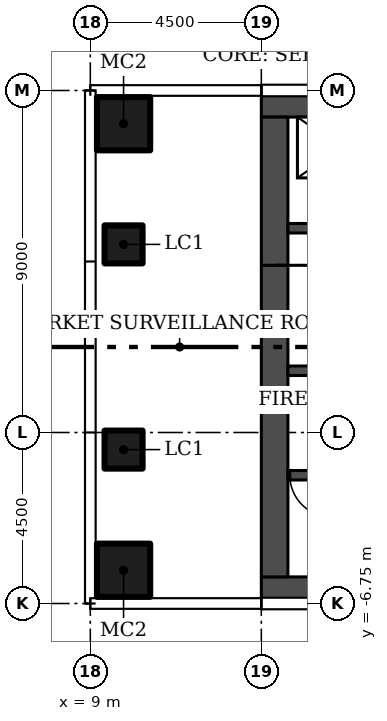
"""IFC4 building model, lengths in metres.
Left out: names, types, materials, properties, quantities, classifications, styles, units other than length and angle.
Written with IfcOpenShell. Run it as: python <this file> out.ifc"""

import sys

from ifc_helpers import new_model, si_unit, direction, frame, frame_2d, origin, origin_2d, place, context, subcontext, project, spatial, rectangle, hollow_rectangle, extrude, element, fill, save


model = new_model("IFC4")
c1 = context("Model", 3, precision=1e-05, world=origin(), true_north=direction((0.0, 1.0)))
c2 = subcontext(c1, "Body", "Model", "MODEL_VIEW")
j1 = project(units=[si_unit("LENGTHUNIT", "METRE"), si_unit("PLANEANGLEUNIT", "RADIAN")], contexts=[c1])
p1 = place(None, origin())
s1 = spatial("IfcSite", under=j1, at=p1, CompositionType="ELEMENT")
p2 = place(p1, origin())
s2 = spatial("IfcBuilding", under=s1, at=p2, CompositionType="ELEMENT")
p3 = place(p2, frame((0.0, 0.0, 57.6)))
s3 = spatial("IfcBuildingStorey", under=s2, at=p3, CompositionType="ELEMENT", Elevation=57.6)
for number, where in (
    (1, (9.875, -5.875, 0.0)),
    (2, (9.875, 5.875, 0.0)),
):
    element("IfcColumn", number, at=place(p3, frame(where)), inside=s3, PredefinedType="COLUMN", context=c2, shape_type="SweptSolid", body=[
        extrude(hollow_rectangle(XDim=1.4, YDim=1.4, WallThickness=0.05, at=origin_2d()), origin(), (0.0, 0.0, 1.0), 3.55),
    ])
for number, where in (
    (3, (9.875, -2.7, 0.0)),
    (4, (9.875, 2.7, 0.0)),
):
    element("IfcColumn", number, at=place(p3, frame(where)), inside=s3, PredefinedType="COLUMN", context=c2, shape_type="SweptSolid", body=[
        extrude(hollow_rectangle(XDim=1.0, YDim=1.0, WallThickness=0.04, at=origin_2d()), origin(), (0.0, 0.0, 1.0), 3.55),
    ])
for number, where in (
    (5, (13.5, -6.4, 0.0)),
    (6, (13.5, 6.4, 0.0)),
):
    element("IfcWall", number, at=place(p3, frame(where)), inside=s3, PredefinedType="SHEAR", context=c2, shape_type="SweptSolid", body=[
        extrude(rectangle(XDim=13.5, YDim=0.7, at=frame_2d((6.75, 0.0))), origin(), (0.0, 0.0, 1.0), 3.55),
    ])
p4 = place(p3, frame((13.85, 6.05, 0.0), z_axis=(0.0, 0.0, 1.0), x_axis=(0.0, -1.0, 0.0)))
e7 = element("IfcWall", 7, at=p4, inside=s3, PredefinedType="SHEAR", context=c2, shape_type="SweptSolid", body=[
    extrude(rectangle(XDim=12.1, YDim=0.7, at=frame_2d((6.05, 0.0))), origin(), (0.0, 0.0, 1.0), 3.55),
])
p5 = place(p4, frame((3.9, 0.0, 0.0)))
e8 = element("IfcOpeningElement", 8, at=p5, cuts=e7, PredefinedType="OPENING", context=c2, shape_type="SweptSolid", body=[
    extrude(rectangle(XDim=1.8, YDim=2.4, at=frame_2d((0.9, 1.2))), frame((0.0, 0.36, 0.0), z_axis=(0.0, -1.0, 0.0), x_axis=(1.0, 0.0, 0.0)), (0.0, 0.0, 1.0), 0.72),
])
p6 = place(p3, frame((26.3, -3.375, 0.0), z_axis=(0.0, 0.0, 1.0), x_axis=(-1.0, 0.0, 0.0)))
e9 = element("IfcWall", 9, at=p6, inside=s3, PredefinedType="SHEAR", context=c2, shape_type="SweptSolid", body=[
    extrude(rectangle(XDim=12.1, YDim=0.25, at=frame_2d((6.05, 0.0))), origin(), (0.0, 0.0, 1.0), 3.55),
])
p7 = place(p6, frame((10.95, 0.0, 0.0)))
e10 = element("IfcOpeningElement", 10, at=p7, cuts=e9, PredefinedType="OPENING", context=c2, shape_type="SweptSolid", body=[
    extrude(rectangle(XDim=1.1, YDim=2.1, at=frame_2d((0.55, 1.05))), frame((0.0, 0.135, 0.0), z_axis=(0.0, -1.0, 0.0), x_axis=(1.0, 0.0, 0.0)), (0.0, 0.0, 1.0), 0.27),
])
p8 = place(p3, frame((26.3, -0.625, 0.0), z_axis=(0.0, 0.0, 1.0), x_axis=(-1.0, 0.0, 0.0)))
e11 = element("IfcWall", 11, at=p8, inside=s3, PredefinedType="SHEAR", context=c2, shape_type="SweptSolid", body=[
    extrude(rectangle(XDim=12.1, YDim=0.25, at=frame_2d((6.05, 0.0))), origin(), (0.0, 0.0, 1.0), 3.55),
])
p9 = place(p8, frame((8.65, 0.0, 0.0)))
e12 = element("IfcOpeningElement", 12, at=p9, cuts=e11, PredefinedType="OPENING", context=c2, shape_type="SweptSolid", body=[
    extrude(rectangle(XDim=1.2, YDim=2.1, at=frame_2d((0.6, 1.05))), frame((0.0, 0.135, 0.0), z_axis=(0.0, -1.0, 0.0), x_axis=(1.0, 0.0, 0.0)), (0.0, 0.0, 1.0), 0.27),
])
p10 = place(p8, frame((1.175, 0.0, 0.0)))
e13 = element("IfcOpeningElement", 13, at=p10, cuts=e11, PredefinedType="OPENING", context=c2, shape_type="SweptSolid", body=[
    extrude(rectangle(XDim=0.9, YDim=2.1, at=frame_2d((0.45, 1.05))), frame((0.0, 0.135, 0.0), z_axis=(0.0, -1.0, 0.0), x_axis=(1.0, 0.0, 0.0)), (0.0, 0.0, 1.0), 0.27),
])
p11 = place(p3, frame((14.2, 3.125, 0.0)))
e14 = element("IfcWall", 14, at=p11, inside=s3, PredefinedType="SHEAR", context=c2, shape_type="SweptSolid", body=[
    extrude(rectangle(XDim=12.1, YDim=0.25, at=frame_2d((6.05, 0.0))), origin(), (0.0, 0.0, 1.0), 3.55),
])
p12 = place(p11, frame((0.85, 0.0, 0.0)))
e15 = element("IfcOpeningElement", 15, at=p12, cuts=e14, PredefinedType="OPENING", context=c2, shape_type="SweptSolid", body=[
    extrude(rectangle(XDim=1.1, YDim=2.1, at=frame_2d((0.55, 1.05))), frame((0.0, 0.135, 0.0), z_axis=(0.0, -1.0, 0.0), x_axis=(1.0, 0.0, 0.0)), (0.0, 0.0, 1.0), 0.27),
])
p13 = place(p11, frame((3.9, 0.0, 0.0)))
e16 = element("IfcOpeningElement", 16, at=p13, cuts=e14, PredefinedType="OPENING", context=c2, shape_type="SweptSolid", body=[
    extrude(rectangle(XDim=1.1, YDim=2.1, at=frame_2d((0.55, 1.05))), frame((0.0, 0.135, 0.0), z_axis=(0.0, -1.0, 0.0), x_axis=(1.0, 0.0, 0.0)), (0.0, 0.0, 1.0), 0.27),
])
p14 = place(p5, origin())
e17 = element("IfcDoor", 17, at=p14, inside=s3, OperationType="DOUBLE_DOOR_SINGLE_SWING", PredefinedType="DOOR", context=c2, shape_type="SweptSolid", body=[
    extrude(rectangle(XDim=1.8, YDim=2.4, at=frame_2d((0.9, 1.2))), frame((0.0, 0.025, 0.0), z_axis=(0.0, -1.0, 0.0), x_axis=(1.0, 0.0, 0.0)), (0.0, 0.0, 1.0), 0.05),
])
fill(e8, e17)
p15 = place(p7, origin())
e18 = element("IfcDoor", 18, at=p15, inside=s3, OperationType="SINGLE_SWING_RIGHT", PredefinedType="DOOR", context=c2, shape_type="SweptSolid", body=[
    extrude(rectangle(XDim=1.1, YDim=2.1, at=frame_2d((0.55, 1.05))), frame((0.0, 0.025, 0.0), z_axis=(0.0, -1.0, 0.0), x_axis=(1.0, 0.0, 0.0)), (0.0, 0.0, 1.0), 0.05),
])
fill(e10, e18)
save(model, sys.argv[1])
